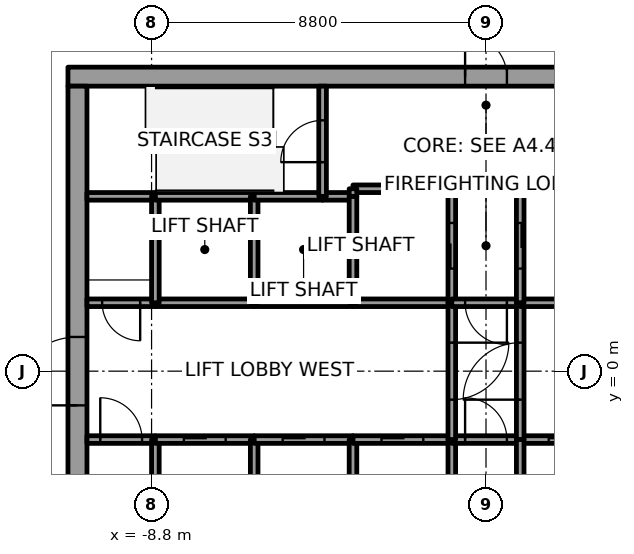
"""IFC4 building model, lengths in metres.
Left out: names, types, materials, properties, quantities, classifications, styles, units other than length and angle.
Written with IfcOpenShell. Run it as: python <this file> out.ifc"""

import sys

from ifc_helpers import new_model, si_unit, direction, frame, frame_2d, origin, place, context, subcontext, project, spatial, rectangle, extrude, element, fill, save


model = new_model("IFC4")
c1 = context("Model", 3, precision=1e-05, world=origin(), true_north=direction((0.0, 1.0)))
c2 = subcontext(c1, "Body", "Model", "MODEL_VIEW")
j1 = project(units=[si_unit("LENGTHUNIT", "METRE"), si_unit("PLANEANGLEUNIT", "RADIAN")], contexts=[c1])
p1 = place(None, origin())
s1 = spatial("IfcSite", under=j1, at=p1, CompositionType="ELEMENT")
p2 = place(p1, origin())
s2 = spatial("IfcBuilding", under=s1, at=p2, CompositionType="ELEMENT")
p3 = place(p2, frame((0.0, 0.0, 197.8)))
s3 = spatial("IfcBuildingStorey", under=s2, at=p3, CompositionType="ELEMENT", Elevation=197.8)
p4 = place(p3, frame((-11.0, 7.75, 0.0), z_axis=(0.0, 0.0, 1.0), x_axis=(1.0, 0.0, 0.0)))
e1 = element("IfcWall", 1, at=p4, inside=s3, PredefinedType="SHEAR", context=c2, shape_type="SweptSolid", body=[
    extrude(rectangle(XDim=22.0, YDim=0.5, at=frame_2d((11.0, 0.0))), origin(), (0.0, 0.0, 1.0), 4.0),
])
p5 = place(p4, frame((10.45, 0.0, 0.0)))
e2 = element("IfcOpeningElement", 2, at=p5, cuts=e1, PredefinedType="OPENING", context=c2, shape_type="SweptSolid", body=[
    extrude(rectangle(XDim=1.1, YDim=2.1, at=frame_2d((0.55, 1.05))), frame((0.0, 0.25, 0.0), z_axis=(0.0, -1.0, 0.0), x_axis=(1.0, 0.0, 0.0)), (0.0, 0.0, 1.0), 0.5),
])
p6 = place(p3, frame((-10.75, -7.5, 0.0), z_axis=(0.0, 0.0, 1.0), x_axis=(0.0, 1.0, 0.0)))
e3 = element("IfcWall", 3, at=p6, inside=s3, PredefinedType="SHEAR", context=c2, shape_type="SweptSolid", body=[
    extrude(rectangle(XDim=15.0, YDim=0.5, at=frame_2d((7.5, 0.0))), origin(), (0.0, 0.0, 1.0), 4.0),
])
p7 = place(p6, frame((6.6, 0.0, 0.0)))
e4 = element("IfcOpeningElement", 4, at=p7, cuts=e3, PredefinedType="OPENING", context=c2, shape_type="SweptSolid", body=[
    extrude(rectangle(XDim=1.8, YDim=2.1, at=frame_2d((0.9, 1.05))), frame((0.0, 0.25, 0.0), z_axis=(0.0, -1.0, 0.0), x_axis=(1.0, 0.0, 0.0)), (0.0, 0.0, 1.0), 0.5),
])
p8 = place(p3, frame((-10.5, -1.8, 0.0), z_axis=(0.0, 0.0, 1.0), x_axis=(1.0, 0.0, 0.0)))
e5 = element("IfcWall", 5, at=p8, inside=s3, PredefinedType="SOLIDWALL", context=c2, shape_type="SweptSolid", body=[
    extrude(rectangle(XDim=1.8, YDim=0.2, at=frame_2d((0.9, 0.0))), origin(), (0.0, 0.0, 1.0), 3.85),
])
p9 = place(p8, frame((0.35, 0.0, 0.0)))
e6 = element("IfcOpeningElement", 6, at=p9, cuts=e5, PredefinedType="OPENING", context=c2, shape_type="SweptSolid", body=[
    extrude(rectangle(XDim=1.1, YDim=2.1, at=frame_2d((0.55, 1.05))), frame((0.0, 0.1, 0.0), z_axis=(0.0, -1.0, 0.0), x_axis=(1.0, 0.0, 0.0)), (0.0, 0.0, 1.0), 0.2),
])
p10 = place(p3, frame((-8.7, 1.8, 0.0), z_axis=(0.0, 0.0, 1.0), x_axis=(-1.0, 0.0, 0.0)))
e7 = element("IfcWall", 7, at=p10, inside=s3, PredefinedType="SOLIDWALL", context=c2, shape_type="SweptSolid", body=[
    extrude(rectangle(XDim=1.8, YDim=0.2, at=frame_2d((0.9, 0.0))), origin(), (0.0, 0.0, 1.0), 3.85),
])
p11 = place(p10, frame((0.4, 0.0, 0.0)))
e8 = element("IfcOpeningElement", 8, at=p11, cuts=e7, PredefinedType="OPENING", context=c2, shape_type="SweptSolid", body=[
    extrude(rectangle(XDim=1.0, YDim=2.1, at=frame_2d((0.5, 1.05))), frame((0.0, 0.1, 0.0), z_axis=(0.0, -1.0, 0.0), x_axis=(1.0, 0.0, 0.0)), (0.0, 0.0, 1.0), 0.2),
])
p12 = place(p3, frame((-8.7, 4.6, 0.0), z_axis=(0.0, 0.0, 1.0), x_axis=(-1.0, 0.0, 0.0)))
e9 = element("IfcWall", 9, at=p12, inside=s3, PredefinedType="SOLIDWALL", context=c2, shape_type="SweptSolid", body=[
    extrude(rectangle(XDim=1.8, YDim=0.2, at=frame_2d((0.9, 0.0))), origin(), (0.0, 0.0, 1.0), 3.85),
])
p13 = place(p3, frame((-8.7, -4.6, 0.0), z_axis=(0.0, 0.0, 1.0), x_axis=(0.0, 1.0, 0.0)))
e10 = element("IfcWall", 10, at=p13, inside=s3, PredefinedType="SOLIDWALL", context=c2, shape_type="SweptSolid", body=[
    extrude(rectangle(XDim=2.8, YDim=0.2, at=frame_2d((1.4, 0.0))), origin(), (0.0, 0.0, 1.0), 3.85),
])
p14 = place(p3, frame((-8.7, -1.8, 0.0), z_axis=(0.0, 0.0, 1.0), x_axis=(1.0, 0.0, 0.0)))
e11 = element("IfcWall", 11, at=p14, inside=s3, PredefinedType="SOLIDWALL", context=c2, shape_type="SweptSolid", body=[
    extrude(rectangle(XDim=2.6, YDim=0.2, at=frame_2d((1.3, 0.0))), origin(), (0.0, 0.0, 1.0), 3.85),
])
p15 = place(p14, frame((0.75, 0.0, 0.0)))
e12 = element("IfcOpeningElement", 12, at=p15, cuts=e11, PredefinedType="OPENING", context=c2, shape_type="SweptSolid", body=[
    extrude(rectangle(XDim=1.1, YDim=2.1, at=frame_2d((0.55, 1.05))), frame((0.0, 0.1, 0.0), z_axis=(0.0, -1.0, 0.0), x_axis=(1.0, 0.0, 0.0)), (0.0, 0.0, 1.0), 0.2),
])
p16 = place(p3, frame((-6.1, 1.8, 0.0), z_axis=(0.0, 0.0, 1.0), x_axis=(-1.0, 0.0, 0.0)))
e13 = element("IfcWall", 13, at=p16, inside=s3, PredefinedType="SOLIDWALL", context=c2, shape_type="SweptSolid", body=[
    extrude(rectangle(XDim=2.6, YDim=0.2, at=frame_2d((1.3, 0.0))), origin(), (0.0, 0.0, 1.0), 3.85),
])
p17 = place(p3, frame((-8.7, 1.8, 0.0), z_axis=(0.0, 0.0, 1.0), x_axis=(0.0, 1.0, 0.0)))
e14 = element("IfcWall", 14, at=p17, inside=s3, PredefinedType="SOLIDWALL", context=c2, shape_type="SweptSolid", body=[
    extrude(rectangle(XDim=2.8, YDim=0.2, at=frame_2d((1.4, 0.0))), origin(), (0.0, 0.0, 1.0), 3.85),
])
p18 = place(p3, frame((-6.1, 4.6, 0.0), z_axis=(0.0, 0.0, 1.0), x_axis=(-1.0, 0.0, 0.0)))
e15 = element("IfcWall", 15, at=p18, inside=s3, PredefinedType="SOLIDWALL", context=c2, shape_type="SweptSolid", body=[
    extrude(rectangle(XDim=2.6, YDim=0.2, at=frame_2d((1.3, 0.0))), origin(), (0.0, 0.0, 1.0), 3.85),
])
p19 = place(p3, frame((-6.1, -4.6, 0.0), z_axis=(0.0, 0.0, 1.0), x_axis=(0.0, 1.0, 0.0)))
e16 = element("IfcWall", 16, at=p19, inside=s3, PredefinedType="SOLIDWALL", context=c2, shape_type="SweptSolid", body=[
    extrude(rectangle(XDim=2.8, YDim=0.2, at=frame_2d((1.4, 0.0))), origin(), (0.0, 0.0, 1.0), 3.85),
])
p20 = place(p3, frame((-6.1, -1.8, 0.0), z_axis=(0.0, 0.0, 1.0), x_axis=(1.0, 0.0, 0.0)))
e17 = element("IfcWall", 17, at=p20, inside=s3, PredefinedType="SOLIDWALL", context=c2, shape_type="SweptSolid", body=[
    extrude(rectangle(XDim=2.6, YDim=0.2, at=frame_2d((1.3, 0.0))), origin(), (0.0, 0.0, 1.0), 3.85),
])
p21 = place(p20, frame((0.75, 0.0, 0.0)))
e18 = element("IfcOpeningElement", 18, at=p21, cuts=e17, PredefinedType="OPENING", context=c2, shape_type="SweptSolid", body=[
    extrude(rectangle(XDim=1.1, YDim=2.1, at=frame_2d((0.55, 1.05))), frame((0.0, 0.1, 0.0), z_axis=(0.0, -1.0, 0.0), x_axis=(1.0, 0.0, 0.0)), (0.0, 0.0, 1.0), 0.2),
])
p22 = place(p3, frame((-3.5, 1.8, 0.0), z_axis=(0.0, 0.0, 1.0), x_axis=(-1.0, 0.0, 0.0)))
e19 = element("IfcWall", 19, at=p22, inside=s3, PredefinedType="SOLIDWALL", context=c2, shape_type="SweptSolid", body=[
    extrude(rectangle(XDim=2.6, YDim=0.2, at=frame_2d((1.3, 0.0))), origin(), (0.0, 0.0, 1.0), 3.85),
])
p23 = place(p3, frame((-6.1, 1.8, 0.0), z_axis=(0.0, 0.0, 1.0), x_axis=(0.0, 1.0, 0.0)))
e20 = element("IfcWall", 20, at=p23, inside=s3, PredefinedType="SOLIDWALL", context=c2, shape_type="SweptSolid", body=[
    extrude(rectangle(XDim=2.8, YDim=0.2, at=frame_2d((1.4, 0.0))), origin(), (0.0, 0.0, 1.0), 3.85),
])
p24 = place(p3, frame((-4.3, 4.6, 0.0), z_axis=(0.0, 0.0, 1.0), x_axis=(-1.0, 0.0, 0.0)))
e21 = element("IfcWall", 21, at=p24, inside=s3, PredefinedType="SOLIDWALL", context=c2, shape_type="SweptSolid", body=[
    extrude(rectangle(XDim=1.8, YDim=0.2, at=frame_2d((0.9, 0.0))), origin(), (0.0, 0.0, 1.0), 3.85),
])
p25 = place(p3, frame((-3.5, 4.6, 0.0), z_axis=(0.0, 0.0, 1.0), x_axis=(-1.0, 0.0, 0.0)))
e22 = element("IfcWall", 22, at=p25, inside=s3, PredefinedType="SOLIDWALL", context=c2, shape_type="SweptSolid", body=[
    extrude(rectangle(XDim=0.8, YDim=0.2, at=frame_2d((0.4, 0.0))), origin(), (0.0, 0.0, 1.0), 3.85),
])
p26 = place(p3, frame((-4.3, 4.6, 0.0), z_axis=(0.0, 0.0, 1.0), x_axis=(0.0, 1.0, 0.0)))
e23 = element("IfcWall", 23, at=p26, inside=s3, PredefinedType="SOLIDWALL", context=c2, shape_type="SweptSolid", body=[
    extrude(rectangle(XDim=2.9, YDim=0.2, at=frame_2d((1.45, 0.0))), origin(), (0.0, 0.0, 1.0), 3.85),
])
p27 = place(p26, frame((0.9, 0.0, 0.0)))
e24 = element("IfcOpeningElement", 24, at=p27, cuts=e23, PredefinedType="OPENING", context=c2, shape_type="SweptSolid", body=[
    extrude(rectangle(XDim=1.1, YDim=2.1, at=frame_2d((0.55, 1.05))), frame((0.0, 0.1, 0.0), z_axis=(0.0, -1.0, 0.0), x_axis=(1.0, 0.0, 0.0)), (0.0, 0.0, 1.0), 0.2),
])
p28 = place(p3, frame((-3.5, -4.6, 0.0), z_axis=(0.0, 0.0, 1.0), x_axis=(0.0, 1.0, 0.0)))
e25 = element("IfcWall", 25, at=p28, inside=s3, PredefinedType="SOLIDWALL", context=c2, shape_type="SweptSolid", body=[
    extrude(rectangle(XDim=2.8, YDim=0.2, at=frame_2d((1.4, 0.0))), origin(), (0.0, 0.0, 1.0), 3.85),
])
p29 = place(p3, frame((-3.5, -1.8, 0.0), z_axis=(0.0, 0.0, 1.0), x_axis=(1.0, 0.0, 0.0)))
e26 = element("IfcWall", 26, at=p29, inside=s3, PredefinedType="SOLIDWALL", context=c2, shape_type="SweptSolid", body=[
    extrude(rectangle(XDim=2.6, YDim=0.2, at=frame_2d((1.3, 0.0))), origin(), (0.0, 0.0, 1.0), 3.85),
])
p30 = place(p29, frame((0.75, 0.0, 0.0)))
e27 = element("IfcOpeningElement", 27, at=p30, cuts=e26, PredefinedType="OPENING", context=c2, shape_type="SweptSolid", body=[
    extrude(rectangle(XDim=1.1, YDim=2.1, at=frame_2d((0.55, 1.05))), frame((0.0, 0.1, 0.0), z_axis=(0.0, -1.0, 0.0), x_axis=(1.0, 0.0, 0.0)), (0.0, 0.0, 1.0), 0.2),
])
p31 = place(p3, frame((-0.9, 1.8, 0.0), z_axis=(0.0, 0.0, 1.0), x_axis=(-1.0, 0.0, 0.0)))
e28 = element("IfcWall", 28, at=p31, inside=s3, PredefinedType="SOLIDWALL", context=c2, shape_type="SweptSolid", body=[
    extrude(rectangle(XDim=2.6, YDim=0.2, at=frame_2d((1.3, 0.0))), origin(), (0.0, 0.0, 1.0), 3.85),
])
p32 = place(p3, frame((-3.5, 4.6, 0.0), z_axis=(0.0, 0.0, 1.0), x_axis=(0.0, -1.0, 0.0)))
e29 = element("IfcWall", 29, at=p32, inside=s3, PredefinedType="SOLIDWALL", context=c2, shape_type="SweptSolid", body=[
    extrude(rectangle(XDim=2.8, YDim=0.2, at=frame_2d((1.4, 0.0))), origin(), (0.0, 0.0, 1.0), 3.85),
])
p33 = place(p3, frame((-0.9, 1.8, 0.0), z_axis=(0.0, 0.0, 1.0), x_axis=(0.0, 1.0, 0.0)))
e30 = element("IfcWall", 30, at=p33, inside=s3, PredefinedType="SOLIDWALL", context=c2, shape_type="SweptSolid", body=[
    extrude(rectangle(XDim=3.0, YDim=0.2, at=frame_2d((1.5, 0.0))), origin(), (0.0, 0.0, 1.0), 3.85),
])
p34 = place(p33, frame((0.9, 0.0, 0.0)))
e31 = element("IfcOpeningElement", 31, at=p34, cuts=e30, PredefinedType="OPENING", context=c2, shape_type="SweptSolid", body=[
    extrude(rectangle(XDim=1.2, YDim=2.1, at=frame_2d((0.6, 1.05))), frame((0.0, 0.1, 0.0), z_axis=(0.0, -1.0, 0.0), x_axis=(1.0, 0.0, 0.0)), (0.0, 0.0, 1.0), 0.2),
])
p35 = place(p3, frame((-0.9, 4.8, 0.0), z_axis=(0.0, 0.0, 1.0), x_axis=(-1.0, 0.0, 0.0)))
e32 = element("IfcWall", 32, at=p35, inside=s3, PredefinedType="SOLIDWALL", context=c2, shape_type="SweptSolid", body=[
    extrude(rectangle(XDim=2.6, YDim=0.2, at=frame_2d((1.3, 0.0))), origin(), (0.0, 0.0, 1.0), 3.85),
])
p36 = place(p3, frame((-3.5, 4.8, 0.0), z_axis=(0.0, 0.0, 1.0), x_axis=(0.0, -1.0, 0.0)))
e33 = element("IfcWall", 33, at=p36, inside=s3, PredefinedType="SOLIDWALL", context=c2, shape_type="SweptSolid", body=[
    extrude(rectangle(XDim=0.2, YDim=0.2, at=frame_2d((0.1, 0.0))), origin(), (0.0, 0.0, 1.0), 3.85),
])
p37 = place(p3, frame((-0.9, -4.6, 0.0), z_axis=(0.0, 0.0, 1.0), x_axis=(0.0, 1.0, 0.0)))
e34 = element("IfcWall", 34, at=p37, inside=s3, PredefinedType="SOLIDWALL", context=c2, shape_type="SweptSolid", body=[
    extrude(rectangle(XDim=2.8, YDim=0.2, at=frame_2d((1.4, 0.0))), origin(), (0.0, 0.0, 1.0), 3.85),
])
p38 = place(p3, frame((-0.9, -1.8, 0.0), z_axis=(0.0, 0.0, 1.0), x_axis=(1.0, 0.0, 0.0)))
e35 = element("IfcWall", 35, at=p38, inside=s3, PredefinedType="SOLIDWALL", context=c2, shape_type="SweptSolid", body=[
    extrude(rectangle(XDim=1.8, YDim=0.2, at=frame_2d((0.9, 0.0))), origin(), (0.0, 0.0, 1.0), 3.85),
])
p39 = place(p38, frame((0.35, 0.0, 0.0)))
e36 = element("IfcOpeningElement", 36, at=p39, cuts=e35, PredefinedType="OPENING", context=c2, shape_type="SweptSolid", body=[
    extrude(rectangle(XDim=1.1, YDim=2.1, at=frame_2d((0.55, 1.05))), frame((0.0, 0.1, 0.0), z_axis=(0.0, -1.0, 0.0), x_axis=(1.0, 0.0, 0.0)), (0.0, 0.0, 1.0), 0.2),
])
p40 = place(p3, frame((-0.9, 1.8, 0.0), z_axis=(0.0, 0.0, 1.0), x_axis=(0.0, -1.0, 0.0)))
e37 = element("IfcWall", 37, at=p40, inside=s3, PredefinedType="SOLIDWALL", context=c2, shape_type="SweptSolid", body=[
    extrude(rectangle(XDim=3.6, YDim=0.2, at=frame_2d((1.8, 0.0))), origin(), (0.0, 0.0, 1.0), 3.85),
])
p41 = place(p40, frame((1.05, 0.0, 0.0)))
e38 = element("IfcOpeningElement", 38, at=p41, cuts=e37, PredefinedType="OPENING", context=c2, shape_type="SweptSolid", body=[
    extrude(rectangle(XDim=1.5, YDim=2.1, at=frame_2d((0.75, 1.05))), frame((0.0, 0.1, 0.0), z_axis=(0.0, -1.0, 0.0), x_axis=(1.0, 0.0, 0.0)), (0.0, 0.0, 1.0), 0.2),
])
p42 = place(p3, frame((0.9, 1.8, 0.0), z_axis=(0.0, 0.0, 1.0), x_axis=(-1.0, 0.0, 0.0)))
e39 = element("IfcWall", 39, at=p42, inside=s3, PredefinedType="SOLIDWALL", context=c2, shape_type="SweptSolid", body=[
    extrude(rectangle(XDim=1.8, YDim=0.2, at=frame_2d((0.9, 0.0))), origin(), (0.0, 0.0, 1.0), 3.85),
])
p43 = place(p42, frame((0.35, 0.0, 0.0)))
e40 = element("IfcOpeningElement", 40, at=p43, cuts=e39, PredefinedType="OPENING", context=c2, shape_type="SweptSolid", body=[
    extrude(rectangle(XDim=1.1, YDim=2.1, at=frame_2d((0.55, 1.05))), frame((0.0, 0.1, 0.0), z_axis=(0.0, -1.0, 0.0), x_axis=(1.0, 0.0, 0.0)), (0.0, 0.0, 1.0), 0.2),
])
p44 = place(p3, frame((0.9, -1.8, 0.0), z_axis=(0.0, 0.0, 1.0), x_axis=(1.0, 0.0, 0.0)))
e41 = element("IfcWall", 41, at=p44, inside=s3, PredefinedType="SOLIDWALL", context=c2, shape_type="SweptSolid", body=[
    extrude(rectangle(XDim=2.6, YDim=0.2, at=frame_2d((1.3, 0.0))), origin(), (0.0, 0.0, 1.0), 3.85),
])
p45 = place(p44, frame((0.75, 0.0, 0.0)))
e42 = element("IfcOpeningElement", 42, at=p45, cuts=e41, PredefinedType="OPENING", context=c2, shape_type="SweptSolid", body=[
    extrude(rectangle(XDim=1.1, YDim=2.1, at=frame_2d((0.55, 1.05))), frame((0.0, 0.1, 0.0), z_axis=(0.0, -1.0, 0.0), x_axis=(1.0, 0.0, 0.0)), (0.0, 0.0, 1.0), 0.2),
])
p46 = place(p3, frame((0.9, -1.8, 0.0), z_axis=(0.0, 0.0, 1.0), x_axis=(0.0, 1.0, 0.0)))
e43 = element("IfcWall", 43, at=p46, inside=s3, PredefinedType="SOLIDWALL", context=c2, shape_type="SweptSolid", body=[
    extrude(rectangle(XDim=3.6, YDim=0.2, at=frame_2d((1.8, 0.0))), origin(), (0.0, 0.0, 1.0), 3.85),
])
p47 = place(p46, frame((1.05, 0.0, 0.0)))
e44 = element("IfcOpeningElement", 44, at=p47, cuts=e43, PredefinedType="OPENING", context=c2, shape_type="SweptSolid", body=[
    extrude(rectangle(XDim=1.5, YDim=2.1, at=frame_2d((0.75, 1.05))), frame((0.0, 0.1, 0.0), z_axis=(0.0, -1.0, 0.0), x_axis=(1.0, 0.0, 0.0)), (0.0, 0.0, 1.0), 0.2),
])
p48 = place(p3, frame((0.9, -1.8, 0.0), z_axis=(0.0, 0.0, 1.0), x_axis=(0.0, -1.0, 0.0)))
e45 = element("IfcWall", 45, at=p48, inside=s3, PredefinedType="SOLIDWALL", context=c2, shape_type="SweptSolid", body=[
    extrude(rectangle(XDim=2.8, YDim=0.2, at=frame_2d((1.4, 0.0))), origin(), (0.0, 0.0, 1.0), 3.85),
])
for number, where, z_axis, x_axis in (
    (46, (3.5, 1.8, 0.0), (0.0, 0.0, 1.0), (-1.0, 0.0, 0.0)),
    (47, (3.5, 4.8, 0.0), (0.0, 0.0, 1.0), (-1.0, 0.0, 0.0)),
):
    element("IfcWall", number, at=place(p3, frame(where, z_axis=z_axis, x_axis=x_axis)), inside=s3, PredefinedType="SOLIDWALL", context=c2, shape_type="SweptSolid", body=[
        extrude(rectangle(XDim=2.6, YDim=0.2, at=frame_2d((1.3, 0.0))), origin(), (0.0, 0.0, 1.0), 3.85),
    ])
p49 = place(p3, frame((0.9, 4.8, 0.0), z_axis=(0.0, 0.0, 1.0), x_axis=(0.0, -1.0, 0.0)))
e48 = element("IfcWall", 48, at=p49, inside=s3, PredefinedType="SOLIDWALL", context=c2, shape_type="SweptSolid", body=[
    extrude(rectangle(XDim=3.0, YDim=0.2, at=frame_2d((1.5, 0.0))), origin(), (0.0, 0.0, 1.0), 3.85),
])
p50 = place(p49, frame((0.9, 0.0, 0.0)))
e49 = element("IfcOpeningElement", 49, at=p50, cuts=e48, PredefinedType="OPENING", context=c2, shape_type="SweptSolid", body=[
    extrude(rectangle(XDim=1.2, YDim=2.1, at=frame_2d((0.6, 1.05))), frame((0.0, 0.1, 0.0), z_axis=(0.0, -1.0, 0.0), x_axis=(1.0, 0.0, 0.0)), (0.0, 0.0, 1.0), 0.2),
])
p51 = place(p15, origin())
e50 = element("IfcDoor", 50, at=p51, inside=s3, OperationType="SLIDING_TO_RIGHT", PredefinedType="DOOR", context=c2, shape_type="SweptSolid", body=[
    extrude(rectangle(XDim=1.1, YDim=2.1, at=frame_2d((0.55, 1.05))), frame((0.0, 0.025, 0.0), z_axis=(0.0, -1.0, 0.0), x_axis=(1.0, 0.0, 0.0)), (0.0, 0.0, 1.0), 0.05),
])
fill(e12, e50)
p52 = place(p21, origin())
e51 = element("IfcDoor", 51, at=p52, inside=s3, OperationType="SLIDING_TO_LEFT", PredefinedType="DOOR", context=c2, shape_type="SweptSolid", body=[
    extrude(rectangle(XDim=1.1, YDim=2.1, at=frame_2d((0.55, 1.05))), frame((0.0, 0.025, 0.0), z_axis=(0.0, -1.0, 0.0), x_axis=(1.0, 0.0, 0.0)), (0.0, 0.0, 1.0), 0.05),
])
fill(e18, e51)
p53 = place(p30, origin())
e52 = element("IfcDoor", 52, at=p53, inside=s3, OperationType="SLIDING_TO_RIGHT", PredefinedType="DOOR", context=c2, shape_type="SweptSolid", body=[
    extrude(rectangle(XDim=1.1, YDim=2.1, at=frame_2d((0.55, 1.05))), frame((0.0, 0.025, 0.0), z_axis=(0.0, -1.0, 0.0), x_axis=(1.0, 0.0, 0.0)), (0.0, 0.0, 1.0), 0.05),
])
fill(e27, e52)
p54 = place(p45, origin())
e53 = element("IfcDoor", 53, at=p54, inside=s3, OperationType="SLIDING_TO_LEFT", PredefinedType="DOOR", context=c2, shape_type="SweptSolid", body=[
    extrude(rectangle(XDim=1.1, YDim=2.1, at=frame_2d((0.55, 1.05))), frame((0.0, 0.025, 0.0), z_axis=(0.0, -1.0, 0.0), x_axis=(1.0, 0.0, 0.0)), (0.0, 0.0, 1.0), 0.05),
])
fill(e42, e53)
p55 = place(p34, origin())
e54 = element("IfcDoor", 54, at=p55, inside=s3, OperationType="SLIDING_TO_LEFT", PredefinedType="DOOR", context=c2, shape_type="SweptSolid", body=[
    extrude(rectangle(XDim=1.2, YDim=2.1, at=frame_2d((0.6, 1.05))), frame((0.0, 0.025, 0.0), z_axis=(0.0, -1.0, 0.0), x_axis=(1.0, 0.0, 0.0)), (0.0, 0.0, 1.0), 0.05),
])
fill(e31, e54)
p56 = place(p50, origin())
e55 = element("IfcDoor", 55, at=p56, inside=s3, OperationType="SLIDING_TO_LEFT", PredefinedType="DOOR", context=c2, shape_type="SweptSolid", body=[
    extrude(rectangle(XDim=1.2, YDim=2.1, at=frame_2d((0.6, 1.05))), frame((0.0, 0.025, 0.0), z_axis=(0.0, -1.0, 0.0), x_axis=(1.0, 0.0, 0.0)), (0.0, 0.0, 1.0), 0.05),
])
fill(e49, e55)
p57 = place(p41, origin())
e56 = element("IfcDoor", 56, at=p57, inside=s3, OperationType="DOUBLE_DOOR_SINGLE_SWING", PredefinedType="DOOR", context=c2, shape_type="SweptSolid", body=[
    extrude(rectangle(XDim=1.5, YDim=2.1, at=frame_2d((0.75, 1.05))), frame((0.0, 0.025, 0.0), z_axis=(0.0, -1.0, 0.0), x_axis=(1.0, 0.0, 0.0)), (0.0, 0.0, 1.0), 0.05),
])
fill(e38, e56)
p58 = place(p47, origin())
e57 = element("IfcDoor", 57, at=p58, inside=s3, OperationType="DOUBLE_DOOR_SINGLE_SWING", PredefinedType="DOOR", context=c2, shape_type="SweptSolid", body=[
    extrude(rectangle(XDim=1.5, YDim=2.1, at=frame_2d((0.75, 1.05))), frame((0.0, 0.025, 0.0), z_axis=(0.0, -1.0, 0.0), x_axis=(1.0, 0.0, 0.0)), (0.0, 0.0, 1.0), 0.05),
])
fill(e44, e57)
p59 = place(p9, origin())
e58 = element("IfcDoor", 58, at=p59, inside=s3, OperationType="SINGLE_SWING_RIGHT", PredefinedType="DOOR", context=c2, shape_type="SweptSolid", body=[
    extrude(rectangle(XDim=1.1, YDim=2.1, at=frame_2d((0.55, 1.05))), frame((0.0, 0.025, 0.0), z_axis=(0.0, -1.0, 0.0), x_axis=(1.0, 0.0, 0.0)), (0.0, 0.0, 1.0), 0.05),
])
fill(e6, e58)
p60 = place(p43, origin())
e59 = element("IfcDoor", 59, at=p60, inside=s3, OperationType="SINGLE_SWING_LEFT", PredefinedType="DOOR", context=c2, shape_type="SweptSolid", body=[
    extrude(rectangle(XDim=1.1, YDim=2.1, at=frame_2d((0.55, 1.05))), frame((0.0, 0.025, 0.0), z_axis=(0.0, -1.0, 0.0), x_axis=(1.0, 0.0, 0.0)), (0.0, 0.0, 1.0), 0.05),
])
fill(e40, e59)
p61 = place(p39, origin())
e60 = element("IfcDoor", 60, at=p61, inside=s3, OperationType="SINGLE_SWING_RIGHT", PredefinedType="DOOR", context=c2, shape_type="SweptSolid", body=[
    extrude(rectangle(XDim=1.1, YDim=2.1, at=frame_2d((0.55, 1.05))), frame((0.0, 0.025, 0.0), z_axis=(0.0, -1.0, 0.0), x_axis=(1.0, 0.0, 0.0)), (0.0, 0.0, 1.0), 0.05),
])
fill(e36, e60)
p62 = place(p11, origin())
e61 = element("IfcDoor", 61, at=p62, inside=s3, OperationType="SINGLE_SWING_LEFT", PredefinedType="DOOR", context=c2, shape_type="SweptSolid", body=[
    extrude(rectangle(XDim=1.0, YDim=2.1, at=frame_2d((0.5, 1.05))), frame((0.0, 0.025, 0.0), z_axis=(0.0, -1.0, 0.0), x_axis=(1.0, 0.0, 0.0)), (0.0, 0.0, 1.0), 0.05),
])
fill(e8, e61)
p63 = place(p27, origin())
e62 = element("IfcDoor", 62, at=p63, inside=s3, OperationType="SINGLE_SWING_RIGHT", PredefinedType="DOOR", context=c2, shape_type="SweptSolid", body=[
    extrude(rectangle(XDim=1.1, YDim=2.1, at=frame_2d((0.55, 1.05))), frame((0.0, 0.025, 0.0), z_axis=(0.0, -1.0, 0.0), x_axis=(1.0, 0.0, 0.0)), (0.0, 0.0, 1.0), 0.05),
])
fill(e24, e62)
p64 = place(p7, origin())
e63 = element("IfcDoor", 63, at=p64, inside=s3, OperationType="DOUBLE_DOOR_SINGLE_SWING", PredefinedType="DOOR", context=c2, shape_type="SweptSolid", body=[
    extrude(rectangle(XDim=1.8, YDim=2.1, at=frame_2d((0.9, 1.05))), frame((0.0, 0.025, 0.0), z_axis=(0.0, -1.0, 0.0), x_axis=(1.0, 0.0, 0.0)), (0.0, 0.0, 1.0), 0.05),
])
fill(e4, e63)
p65 = place(p5, origin())
e64 = element("IfcDoor", 64, at=p65, inside=s3, OperationType="SINGLE_SWING_RIGHT", PredefinedType="DOOR", context=c2, shape_type="SweptSolid", body=[
    extrude(rectangle(XDim=1.1, YDim=2.1, at=frame_2d((0.55, 1.05))), frame((0.0, 0.025, 0.0), z_axis=(0.0, -1.0, 0.0), x_axis=(1.0, 0.0, 0.0)), (0.0, 0.0, 1.0), 0.05),
])
fill(e2, e64)
save(model, sys.argv[1])
